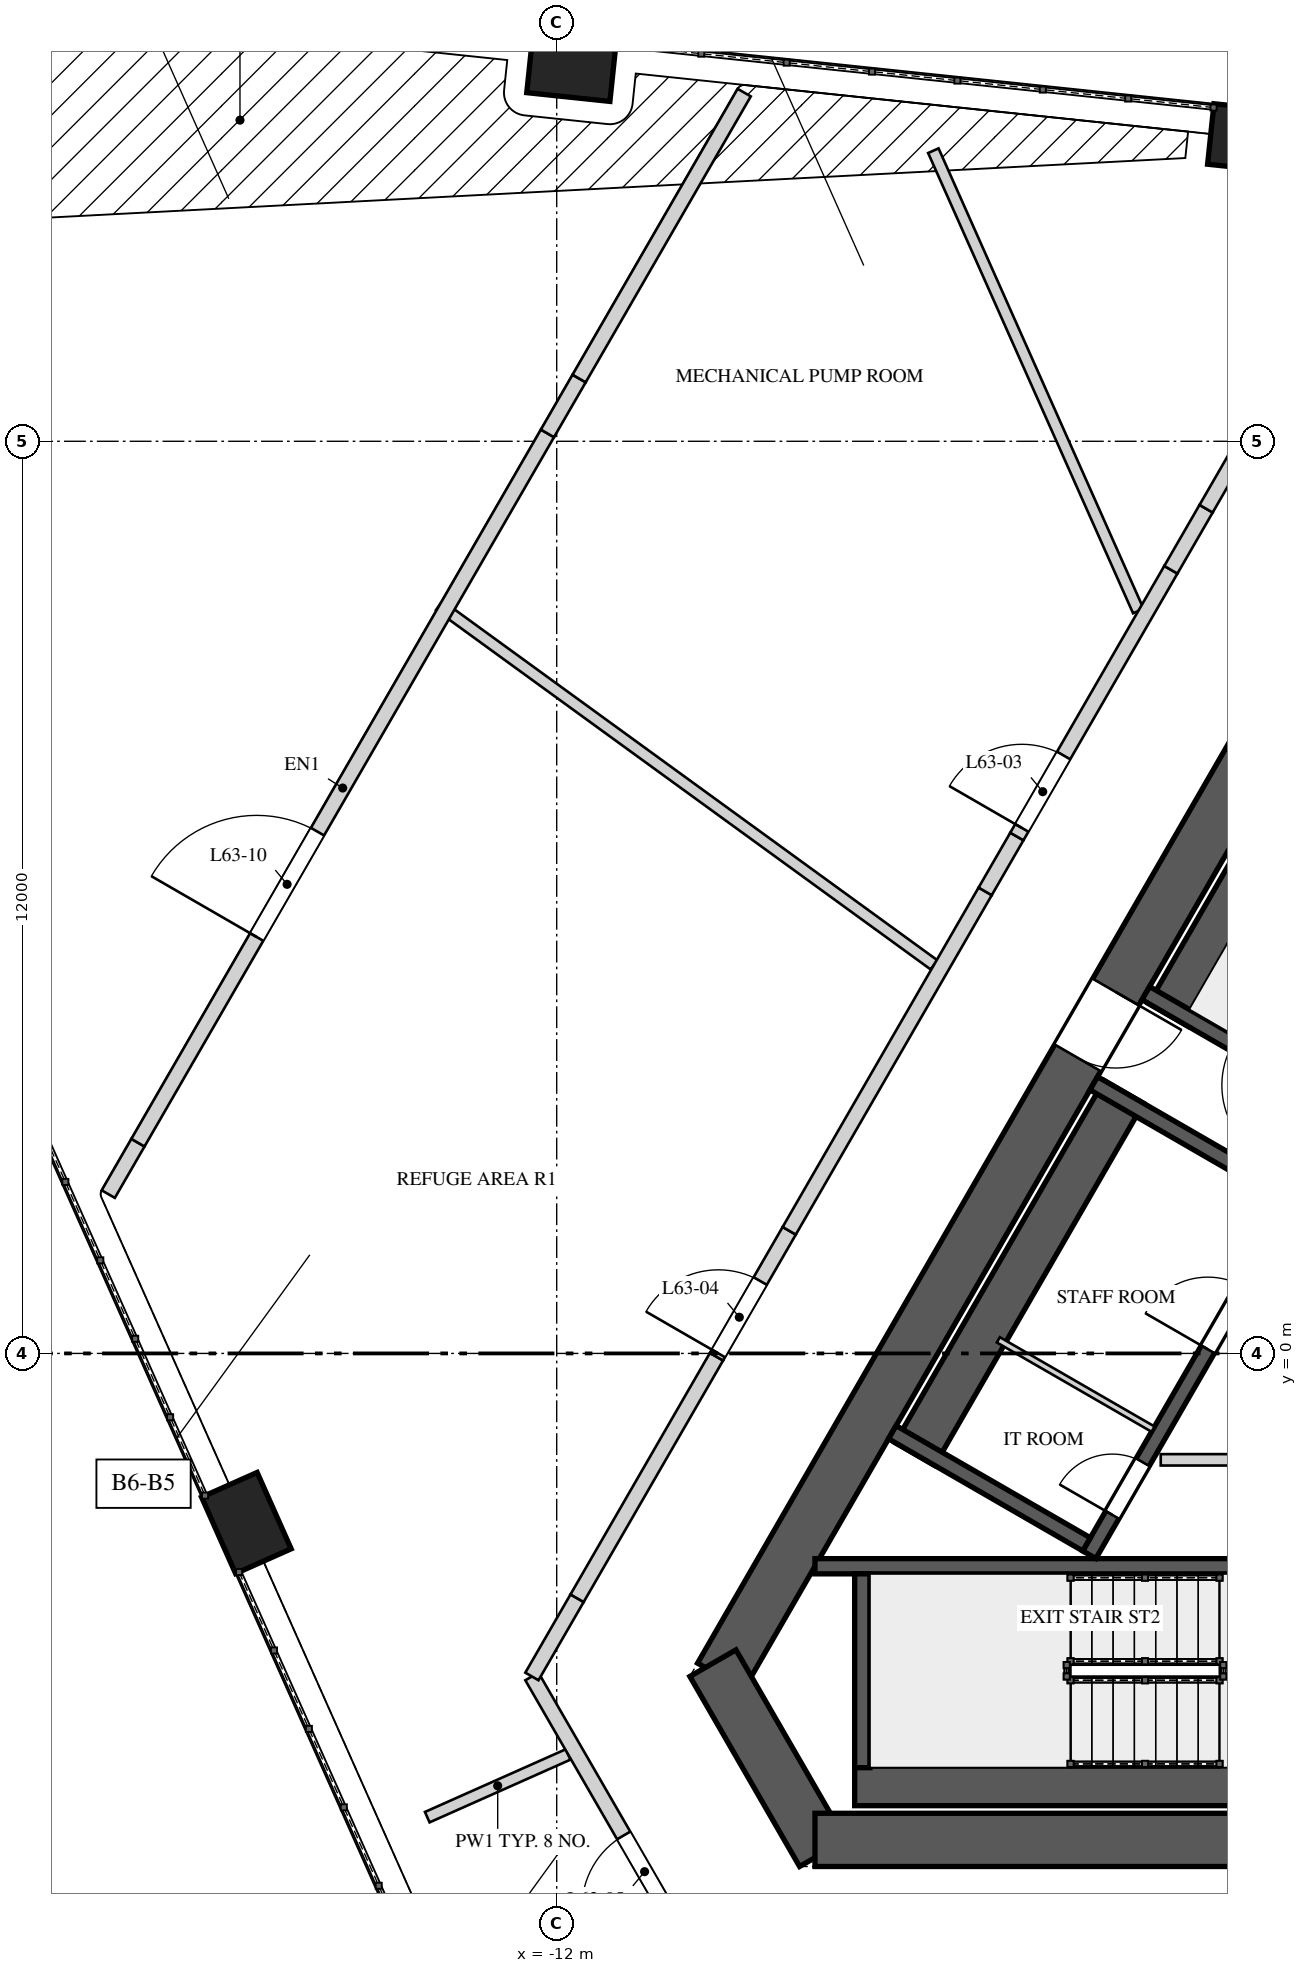
"""IFC4 building model, lengths in metres.
Left out: names, types, materials, properties, quantities, classifications, styles, units other than length and angle.
Written with IfcOpenShell. Run it as: python <this file> out.ifc"""

import sys

from ifc_helpers import new_model, si_unit, direction, frame, frame_2d, origin, origin_2d, place, context, subcontext, project, spatial, polyline, rectangle, outline, extrude, element, fill, save


model = new_model("IFC4")
c1 = context("Model", 3, precision=1e-05, world=origin(), true_north=direction((0.0, 1.0)))
c2 = subcontext(c1, "Body", "Model", "MODEL_VIEW")
j1 = project(units=[si_unit("LENGTHUNIT", "METRE"), si_unit("PLANEANGLEUNIT", "RADIAN")], contexts=[c1])
p1 = place(None, origin())
s1 = spatial("IfcSite", under=j1, at=p1, CompositionType="ELEMENT")
p2 = place(p1, origin())
s2 = spatial("IfcBuilding", under=s1, at=p2, CompositionType="ELEMENT")
p3 = place(p2, frame((0.0, 0.0, 269.2)))
s3 = spatial("IfcBuildingStorey", under=s2, at=p3, CompositionType="ELEMENT", Elevation=269.2)
p4 = place(p3, frame((-1.241, 10.65, 0.0), z_axis=(0.0, 0.0, 1.0), x_axis=(-0.500003331888, -0.866023480109, 0.0)))
e1 = element("IfcWall", 1, at=p4, inside=s3, PredefinedType="SHEAR", context=c2, shape_type="SweptSolid", body=[
    extrude(rectangle(XDim=17.205, YDim=0.7, at=frame_2d((8.603, 0.0))), origin(), (0.0, 0.0, 1.0), 5.2),
])
p5 = place(p4, frame((6.808, 0.0, 0.0)))
e2 = element("IfcOpeningElement", 2, at=p5, cuts=e1, PredefinedType="OPENING", context=c2, shape_type="SweptSolid", body=[
    extrude(rectangle(XDim=1.0, YDim=2.4, at=frame_2d((0.5, 1.2))), frame((0.0, 0.36, 0.0), z_axis=(0.0, -1.0, 0.0), x_axis=(1.0, 0.0, 0.0)), (0.0, 0.0, 1.0), 0.72),
])
p6 = place(p3, frame((-9.945, -4.075, 0.0), z_axis=(0.0, 0.0, 1.0), x_axis=(0.499995765644, -0.866027848477, 0.0)))
e3 = element("IfcWall", 3, at=p6, inside=s3, PredefinedType="SHEAR", context=c2, shape_type="SweptSolid", body=[
    extrude(rectangle(XDim=2.887, YDim=0.7, at=frame_2d((1.443, 0.0))), origin(), (0.0, 0.0, 1.0), 5.2),
])
p7 = place(p3, frame((-8.603, -6.4, 0.0), z_axis=(0.0, 0.0, 1.0), x_axis=(1.0, 0.0, 0.0)))
e4 = element("IfcWall", 4, at=p7, inside=s3, PredefinedType="SHEAR", context=c2, shape_type="SweptSolid", body=[
    extrude(rectangle(XDim=17.205, YDim=0.7, at=frame_2d((8.603, 0.0))), origin(), (0.0, 0.0, 1.0), 5.2),
])
p8 = place(p7, frame((6.808, 0.0, 0.0)))
e5 = element("IfcOpeningElement", 5, at=p8, cuts=e4, PredefinedType="OPENING", context=c2, shape_type="SweptSolid", body=[
    extrude(rectangle(XDim=1.0, YDim=2.4, at=frame_2d((0.5, 1.2))), frame((0.0, 0.36, 0.0), z_axis=(0.0, -1.0, 0.0), x_axis=(1.0, 0.0, 0.0)), (0.0, 0.0, 1.0), 0.72),
])
p9 = place(p7, frame((14.922, 0.0, 0.0)))
e6 = element("IfcOpeningElement", 6, at=p9, cuts=e4, PredefinedType="OPENING", context=c2, shape_type="SweptSolid", body=[
    extrude(rectangle(XDim=0.8, YDim=2.1, at=frame_2d((0.4, 1.05))), frame((0.0, 0.36, 0.0), z_axis=(0.0, -1.0, 0.0), x_axis=(1.0, 0.0, 0.0)), (0.0, 0.0, 1.0), 0.72),
])
for number, where, z_axis, x_axis in (
    (7, (-16.083, -2.231, 0.0), (0.0, 0.0, 1.0), (0.407, -0.914, 0.0)),
    (8, (-2.848, 15.985, 0.0), (0.0, 0.0, 1.0), (-0.995, 0.105, 0.0)),
    (9, (-11.805, 16.927, 0.0), (0.0, 0.0, 1.0), (-0.995, 0.105, 0.0)),
):
    element("IfcColumn", number, at=place(p3, frame(where, z_axis=z_axis, x_axis=x_axis)), inside=s3, PredefinedType="COLUMN", context=c2, shape_type="SweptSolid", body=[
        extrude(rectangle(XDim=1.1, YDim=0.8, at=origin_2d()), origin(), (0.0, 0.0, 1.0), 2.787),
    ])
p10 = place(p3, frame((-0.853, 9.823, 0.0), z_axis=(0.0, 0.0, 1.0), x_axis=(-0.500009909098, -0.866019682689, 0.0)))
e10 = element("IfcWall", 10, at=p10, inside=s3, PredefinedType="SOLIDWALL", context=c2, shape_type="SweptSolid", body=[
    extrude(rectangle(XDim=6.2, YDim=0.6, at=frame_2d((3.1, 0.0))), origin(), (0.0, 0.0, 1.0), 4.85),
])
p11 = place(p3, frame((-1.521, 3.165, 0.0), z_axis=(0.0, 0.0, 1.0), x_axis=(-0.866035871367, 0.499981869177, 0.0)))
e11 = element("IfcWall", 11, at=p11, inside=s3, PredefinedType="SOLIDWALL", context=c2, shape_type="SweptSolid", body=[
    extrude(rectangle(XDim=3.15, YDim=0.2, at=frame_2d((1.575, 0.0))), origin(), (0.0, 0.0, 1.0), 4.85),
])
p12 = place(p11, frame((0.725, 0.0, 0.0)))
e12 = element("IfcOpeningElement", 12, at=p12, cuts=e11, PredefinedType="OPENING", context=c2, shape_type="SweptSolid", body=[
    extrude(rectangle(XDim=1.1, YDim=2.4, at=frame_2d((0.55, 1.2))), frame((0.0, 0.11, 0.0), z_axis=(0.0, -1.0, 0.0), x_axis=(1.0, 0.0, 0.0)), (0.0, 0.0, 1.0), 0.22),
])
p13 = place(p3, frame((-8.08, -5.65, 0.0), z_axis=(0.0, 0.0, 1.0), x_axis=(1.0, 0.0, 0.0)))
e13 = element("IfcWall", 13, at=p13, inside=s3, PredefinedType="SOLIDWALL", context=c2, shape_type="SweptSolid", body=[
    extrude(rectangle(XDim=6.2, YDim=0.6, at=frame_2d((3.1, 0.0))), origin(), (0.0, 0.0, 1.0), 4.85),
])
p14 = place(p3, frame((-8.603, -2.8, 0.0), z_axis=(0.0, 0.0, 1.0), x_axis=(1.0, 0.0, 0.0)))
e14 = element("IfcWall", 14, at=p14, inside=s3, PredefinedType="SOLIDWALL", context=c2, shape_type="SweptSolid", body=[
    extrude(rectangle(XDim=6.723, YDim=0.2, at=frame_2d((3.361, 0.0))), origin(), (0.0, 0.0, 1.0), 4.85),
])
p15 = place(p3, frame((-7.98, -2.9, 0.0), z_axis=(0.0, 0.0, 1.0), x_axis=(0.0, -1.0, 0.0)))
e15 = element("IfcWall", 15, at=p15, inside=s3, PredefinedType="SOLIDWALL", context=c2, shape_type="SweptSolid", body=[
    extrude(rectangle(XDim=2.55, YDim=0.2, at=frame_2d((1.275, 0.0))), origin(), (0.0, 0.0, 1.0), 4.85),
])
p16 = place(p3, frame((-4.993, -2.648, 0.0), z_axis=(0.0, 0.0, 1.0), x_axis=(0.499996545922, 0.866027397988, 0.0)))
e16 = element("IfcWall", 16, at=p16, inside=s3, PredefinedType="SOLIDWALL", context=c2, shape_type="SweptSolid", body=[
    extrude(rectangle(XDim=5.5, YDim=0.2, at=frame_2d((2.75, 0.0))), origin(), (0.0, 0.0, 1.0), 4.85),
])
p17 = place(p16, frame((3.12, 0.0, 0.0)))
e17 = element("IfcOpeningElement", 17, at=p17, cuts=e16, PredefinedType="OPENING", context=c2, shape_type="SweptSolid", body=[
    extrude(rectangle(XDim=0.95, YDim=2.4, at=frame_2d((0.475, 1.2))), frame((0.0, 0.11, 0.0), z_axis=(0.0, -1.0, 0.0), x_axis=(1.0, 0.0, 0.0)), (0.0, 0.0, 1.0), 0.22),
])
p18 = place(p16, frame((0.605, 0.0, 0.0)))
e18 = element("IfcOpeningElement", 18, at=p18, cuts=e16, PredefinedType="OPENING", context=c2, shape_type="SweptSolid", body=[
    extrude(rectangle(XDim=0.8, YDim=2.1, at=frame_2d((0.4, 1.05))), frame((0.0, 0.11, 0.0), z_axis=(0.0, -1.0, 0.0), x_axis=(1.0, 0.0, 0.0)), (0.0, 0.0, 1.0), 0.22),
])
p19 = place(p3, frame((-4.538, 3.44, 0.0), z_axis=(0.0, 0.0, 1.0), x_axis=(-0.499996545922, -0.866027397988, 0.0)))
e19 = element("IfcWall", 19, at=p19, inside=s3, PredefinedType="SOLIDWALL", context=c2, shape_type="SweptSolid", body=[
    extrude(rectangle(XDim=5.5, YDim=0.6, at=frame_2d((2.75, 0.0))), origin(), (0.0, 0.0, 1.0), 4.85),
])
for number, where, z_axis, x_axis in (
    (20, (-2.38, 2.078, 0.0), (0.0, 0.0, 1.0), (-0.866, 0.5, 0.0)),
    (21, (-5.03, -2.512, 0.0), (0.0, 0.0, 1.0), (-0.866, 0.5, 0.0)),
):
    element("IfcWall", number, at=place(p3, frame(where, z_axis=z_axis, x_axis=x_axis)), inside=s3, PredefinedType="SOLIDWALL", context=c2, shape_type="SweptSolid", body=[
        extrude(rectangle(XDim=2.95, YDim=0.2, at=frame_2d((1.475, 0.0))), origin(), (0.0, 0.0, 1.0), 4.85),
    ])
p20 = place(p3, frame((-4.155, -0.996, 0.0), z_axis=(0.0, 0.0, 1.0), x_axis=(-0.866016039709, 0.500016218704, 0.0)))
e22 = element("IfcWall", 22, at=p20, inside=s3, PredefinedType="PARTITIONING", context=c2, shape_type="SweptSolid", body=[
    extrude(rectangle(XDim=2.35, YDim=0.08, at=frame_2d((1.175, 0.0))), origin(), (0.0, 0.0, 1.0), 4.85),
])
p21 = place(p3, frame((-4.053, -1.4, 0.0), z_axis=(0.0, 0.0, 1.0), x_axis=(1.0, 0.0, 0.0)))
e23 = element("IfcWall", 23, at=p21, inside=s3, PredefinedType="PARTITIONING", context=c2, shape_type="SweptSolid", body=[
    extrude(rectangle(XDim=7.876, YDim=0.15, at=frame_2d((3.938, 0.0))), origin(), (0.0, 0.0, 1.0), 4.85),
])
p22 = place(p3, frame((-11.85, -5.276, 0.0), z_axis=(0.0, 0.0, 1.0), x_axis=(-0.913553334727, -0.406718950392, 0.0)))
e24 = element("IfcWall", 24, at=p22, inside=s3, PredefinedType="PARTITIONING", context=c2, shape_type="SweptSolid", body=[
    extrude(rectangle(XDim=2.029, YDim=0.15, at=frame_2d((1.014, 0.0))), origin(), (0.0, 0.0, 1.0), 4.85),
])
p23 = place(p3, frame((-7.037, 5.112, 0.0), z_axis=(0.0, 0.0, 1.0), x_axis=(-0.809012919045, 0.587790861462, 0.0)))
e25 = element("IfcWall", 25, at=p23, inside=s3, PredefinedType="PARTITIONING", context=c2, shape_type="SweptSolid", body=[
    extrude(rectangle(XDim=8.044, YDim=0.15, at=frame_2d((4.022, 0.0))), origin(), (0.0, 0.0, 1.0), 4.85),
])
p24 = place(p3, frame((-4.349, 9.768, 0.0), z_axis=(0.0, 0.0, 1.0), x_axis=(-0.406736425393, 0.913545554561, 0.0)))
e26 = element("IfcWall", 26, at=p24, inside=s3, PredefinedType="PARTITIONING", context=c2, shape_type="SweptSolid", body=[
    extrude(rectangle(XDim=6.628, YDim=0.15, at=frame_2d((3.314, 0.0))), origin(), (0.0, 0.0, 1.0), 4.85),
])
p25 = place(p3, frame((-9.844, -8.55, 0.0), z_axis=(0.0, 0.0, 1.0), x_axis=(-0.50000478328, 0.866022642139, 0.0)))
e27 = element("IfcWall", 27, at=p25, inside=s3, PredefinedType="SOLIDWALL", context=c2, shape_type="SweptSolid", body=[
    extrude(rectangle(XDim=4.965, YDim=0.2, at=frame_2d((2.483, 0.0))), origin(), (0.0, 0.0, 1.0), 4.85),
])
p26 = place(p25, frame((1.45, 0.0, 0.0)))
e28 = element("IfcOpeningElement", 28, at=p26, cuts=e27, PredefinedType="OPENING", context=c2, shape_type="SweptSolid", body=[
    extrude(rectangle(XDim=1.1, YDim=2.2, at=frame_2d((0.55, 1.1))), frame((0.0, 0.11, 0.0), z_axis=(0.0, -1.0, 0.0), x_axis=(1.0, 0.0, 0.0)), (0.0, 0.0, 1.0), 0.22),
])
p27 = place(p3, frame((-12.326, -4.25, 0.0), z_axis=(0.0, 0.0, 1.0), x_axis=(0.499983247966, 0.86603507536, 0.0)))
e29 = element("IfcWall", 29, at=p27, inside=s3, PredefinedType="SOLIDWALL", context=c2, shape_type="SweptSolid", body=[
    extrude(rectangle(XDim=1.188, YDim=0.2, at=frame_2d((0.594, 0.0))), origin(), (0.0, 0.0, 1.0), 4.15),
])
p28 = place(p3, frame((-11.732, -3.221, 0.0), z_axis=(0.0, 0.0, 1.0), x_axis=(0.500018146515, 0.866014926636, 0.0)))
e30 = element("IfcWall", 30, at=p28, inside=s3, PredefinedType="SOLIDWALL", context=c2, shape_type="SweptSolid", body=[
    extrude(rectangle(XDim=3.669, YDim=0.2, at=frame_2d((1.834, 0.0))), origin(), (0.0, 0.0, 1.0), 4.85),
])
p29 = place(p3, frame((-9.898, -0.043, 0.0), z_axis=(0.0, 0.0, 1.0), x_axis=(0.500009674092, 0.866019818373, 0.0)))
e31 = element("IfcWall", 31, at=p29, inside=s3, PredefinedType="SOLIDWALL", context=c2, shape_type="SweptSolid", body=[
    extrude(outline(polyline([(0.0, 0.0), (1.913, 0.0), (1.913, 3.95), (1.048, 3.95), (1.048, 4.85), (0.0, 4.85), (0.0, 0.0)])), frame((0.0, 0.1, 0.0), z_axis=(0.0, -1.0, 0.0), x_axis=(1.0, 0.0, 0.0)), (0.0, 0.0, 1.0), 0.2),
])
p30 = place(p29, frame((0.05, 0.0, 0.0)))
e32 = element("IfcOpeningElement", 32, at=p30, cuts=e31, PredefinedType="OPENING", context=c2, shape_type="SweptSolid", body=[
    extrude(rectangle(XDim=1.1, YDim=2.2, at=frame_2d((0.55, 1.1))), frame((0.0, 0.11, 0.0), z_axis=(0.0, -1.0, 0.0), x_axis=(1.0, 0.0, 0.0)), (0.0, 0.0, 1.0), 0.22),
])
p31 = place(p3, frame((-8.941, 1.613, 0.0), z_axis=(0.0, 0.0, 1.0), x_axis=(0.499973847261, 0.866040502549, 0.0)))
e33 = element("IfcWall", 33, at=p31, inside=s3, PredefinedType="SOLIDWALL", context=c2, shape_type="SweptSolid", body=[
    extrude(rectangle(XDim=5.156, YDim=0.2, at=frame_2d((2.578, 0.0))), origin(), (0.0, 0.0, 1.0), 4.85),
])
p32 = place(p3, frame((-6.363, 6.079, 0.0), z_axis=(0.0, 0.0, 1.0), x_axis=(0.499950631041, 0.86605390509, 0.0)))
e34 = element("IfcWall", 34, at=p32, inside=s3, PredefinedType="SOLIDWALL", context=c2, shape_type="SweptSolid", body=[
    extrude(rectangle(XDim=0.833, YDim=0.2, at=frame_2d((0.417, 0.0))), origin(), (0.0, 0.0, 1.0), 3.95),
])
p33 = place(p3, frame((-5.947, 6.801, 0.0), z_axis=(0.0, 0.0, 1.0), x_axis=(0.500007556608, 0.866021040931, 0.0)))
e35 = element("IfcWall", 35, at=p33, inside=s3, PredefinedType="SOLIDWALL", context=c2, shape_type="SweptSolid", body=[
    extrude(rectangle(XDim=4.052, YDim=0.2, at=frame_2d((2.026, 0.0))), origin(), (0.0, 0.0, 1.0), 4.85),
])
p34 = place(p33, frame((0.131, 0.0, 0.0)))
e36 = element("IfcOpeningElement", 36, at=p34, cuts=e35, PredefinedType="OPENING", context=c2, shape_type="SweptSolid", body=[
    extrude(rectangle(XDim=1.1, YDim=2.2, at=frame_2d((0.55, 1.1))), frame((0.0, 0.11, 0.0), z_axis=(0.0, -1.0, 0.0), x_axis=(1.0, 0.0, 0.0)), (0.0, 0.0, 1.0), 0.22),
])
p35 = place(p3, frame((-3.92, 10.31, 0.0), z_axis=(0.0, 0.0, 1.0), x_axis=(0.500102178127, 0.865966403178, 0.0)))
e37 = element("IfcWall", 37, at=p35, inside=s3, PredefinedType="SOLIDWALL", context=c2, shape_type="SweptSolid", body=[
    extrude(rectangle(XDim=0.927, YDim=0.2, at=frame_2d((0.464, 0.0))), origin(), (0.0, 0.0, 1.0), 4.15),
])
p36 = place(p3, frame((-3.457, 11.113, 0.0), z_axis=(0.0, 0.0, 1.0), x_axis=(0.499953905513, 0.866052014814, 0.0)))
e38 = element("IfcWall", 38, at=p36, inside=s3, PredefinedType="SOLIDWALL", context=c2, shape_type="SweptSolid", body=[
    extrude(rectangle(XDim=1.948, YDim=0.2, at=frame_2d((0.974, 0.0))), origin(), (0.0, 0.0, 1.0), 4.85),
])
p37 = place(p3, frame((-17.9, 2.096, 0.0), z_axis=(0.0, 0.0, 1.0), x_axis=(0.50003806587, 0.866003425329, 0.0)))
e39 = element("IfcWall", 39, at=p37, inside=s3, PredefinedType="SOLIDWALL", context=c2, shape_type="SweptSolid", body=[
    extrude(rectangle(XDim=0.781, YDim=0.2, at=frame_2d((0.391, 0.0))), origin(), (0.0, 0.0, 1.0), 3.95),
])
p38 = place(p3, frame((-17.51, 2.773, 0.0), z_axis=(0.0, 0.0, 1.0), x_axis=(0.500001620546, 0.86602446816, 0.0)))
e40 = element("IfcWall", 40, at=p38, inside=s3, PredefinedType="SOLIDWALL", context=c2, shape_type="SweptSolid", body=[
    extrude(rectangle(XDim=10.775, YDim=0.2, at=frame_2d((5.387, 0.0))), origin(), (0.0, 0.0, 1.0), 4.85),
])
p39 = place(p38, frame((3.125, 0.0, 0.0)))
e41 = element("IfcOpeningElement", 41, at=p39, cuts=e40, PredefinedType="OPENING", context=c2, shape_type="SweptSolid", body=[
    extrude(rectangle(XDim=1.6, YDim=2.3, at=frame_2d((0.8, 1.15))), frame((0.0, 0.11, 0.0), z_axis=(0.0, -1.0, 0.0), x_axis=(1.0, 0.0, 0.0)), (0.0, 0.0, 1.0), 0.22),
])
p40 = place(p3, frame((-12.122, 12.104, 0.0), z_axis=(0.0, 0.0, 1.0), x_axis=(0.500077471398, 0.865980671032, 0.0)))
e42 = element("IfcWall", 42, at=p40, inside=s3, PredefinedType="SOLIDWALL", context=c2, shape_type="SweptSolid", body=[
    extrude(rectangle(XDim=0.833, YDim=0.2, at=frame_2d((0.417, 0.0))), origin(), (0.0, 0.0, 1.0), 3.95),
])
p41 = place(p3, frame((-11.705, 12.826, 0.0), z_axis=(0.0, 0.0, 1.0), x_axis=(0.500007885066, 0.866020851292, 0.0)))
e43 = element("IfcWall", 43, at=p41, inside=s3, PredefinedType="SOLIDWALL", context=c2, shape_type="SweptSolid", body=[
    extrude(rectangle(XDim=4.344, YDim=0.2, at=frame_2d((2.172, 0.0))), origin(), (0.0, 0.0, 1.0), 4.85),
])
p42 = place(p17, origin())
e44 = element("IfcDoor", 44, at=p42, inside=s3, OperationType="SINGLE_SWING_LEFT", PredefinedType="DOOR", context=c2, shape_type="SweptSolid", body=[
    extrude(rectangle(XDim=0.95, YDim=2.4, at=frame_2d((0.475, 1.2))), frame((0.0, 0.025, 0.0), z_axis=(0.0, -1.0, 0.0), x_axis=(1.0, 0.0, 0.0)), (0.0, 0.0, 1.0), 0.05),
])
fill(e17, e44)
p43 = place(p18, origin())
e45 = element("IfcDoor", 45, at=p43, inside=s3, OperationType="SINGLE_SWING_RIGHT", PredefinedType="DOOR", context=c2, shape_type="SweptSolid", body=[
    extrude(rectangle(XDim=0.8, YDim=2.1, at=frame_2d((0.4, 1.05))), frame((0.0, 0.025, 0.0), z_axis=(0.0, -1.0, 0.0), x_axis=(1.0, 0.0, 0.0)), (0.0, 0.0, 1.0), 0.05),
])
fill(e18, e45)
p44 = place(p5, origin())
e46 = element("IfcDoor", 46, at=p44, inside=s3, OperationType="SINGLE_SWING_RIGHT", PredefinedType="DOOR", context=c2, shape_type="SweptSolid", body=[
    extrude(rectangle(XDim=1.0, YDim=2.4, at=frame_2d((0.5, 1.2))), frame((0.0, 0.025, 0.0), z_axis=(0.0, -1.0, 0.0), x_axis=(1.0, 0.0, 0.0)), (0.0, 0.0, 1.0), 0.05),
])
fill(e2, e46)
p45 = place(p34, origin())
e47 = element("IfcDoor", 47, at=p45, inside=s3, OperationType="SINGLE_SWING_LEFT", PredefinedType="DOOR", context=c2, shape_type="SweptSolid", body=[
    extrude(rectangle(XDim=1.1, YDim=2.2, at=frame_2d((0.55, 1.1))), frame((0.0, 0.025, 0.0), z_axis=(0.0, -1.0, 0.0), x_axis=(1.0, 0.0, 0.0)), (0.0, 0.0, 1.0), 0.05),
])
fill(e36, e47)
p46 = place(p30, origin())
e48 = element("IfcDoor", 48, at=p46, inside=s3, OperationType="SINGLE_SWING_RIGHT", PredefinedType="DOOR", context=c2, shape_type="SweptSolid", body=[
    extrude(rectangle(XDim=1.1, YDim=2.2, at=frame_2d((0.55, 1.1))), frame((0.0, 0.025, 0.0), z_axis=(0.0, -1.0, 0.0), x_axis=(1.0, 0.0, 0.0)), (0.0, 0.0, 1.0), 0.05),
])
fill(e32, e48)
p47 = place(p26, origin())
e49 = element("IfcDoor", 49, at=p47, inside=s3, OperationType="SINGLE_SWING_LEFT", PredefinedType="DOOR", context=c2, shape_type="SweptSolid", body=[
    extrude(rectangle(XDim=1.1, YDim=2.2, at=frame_2d((0.55, 1.1))), frame((0.0, 0.025, 0.0), z_axis=(0.0, -1.0, 0.0), x_axis=(1.0, 0.0, 0.0)), (0.0, 0.0, 1.0), 0.05),
])
fill(e28, e49)
p48 = place(p39, origin())
e50 = element("IfcDoor", 50, at=p48, inside=s3, OperationType="DOUBLE_DOOR_SINGLE_SWING", PredefinedType="DOOR", context=c2, shape_type="SweptSolid", body=[
    extrude(rectangle(XDim=1.6, YDim=2.3, at=frame_2d((0.8, 1.15))), frame((0.0, 0.025, 0.0), z_axis=(0.0, -1.0, 0.0), x_axis=(1.0, 0.0, 0.0)), (0.0, 0.0, 1.0), 0.05),
])
fill(e41, e50)
save(model, sys.argv[1])
